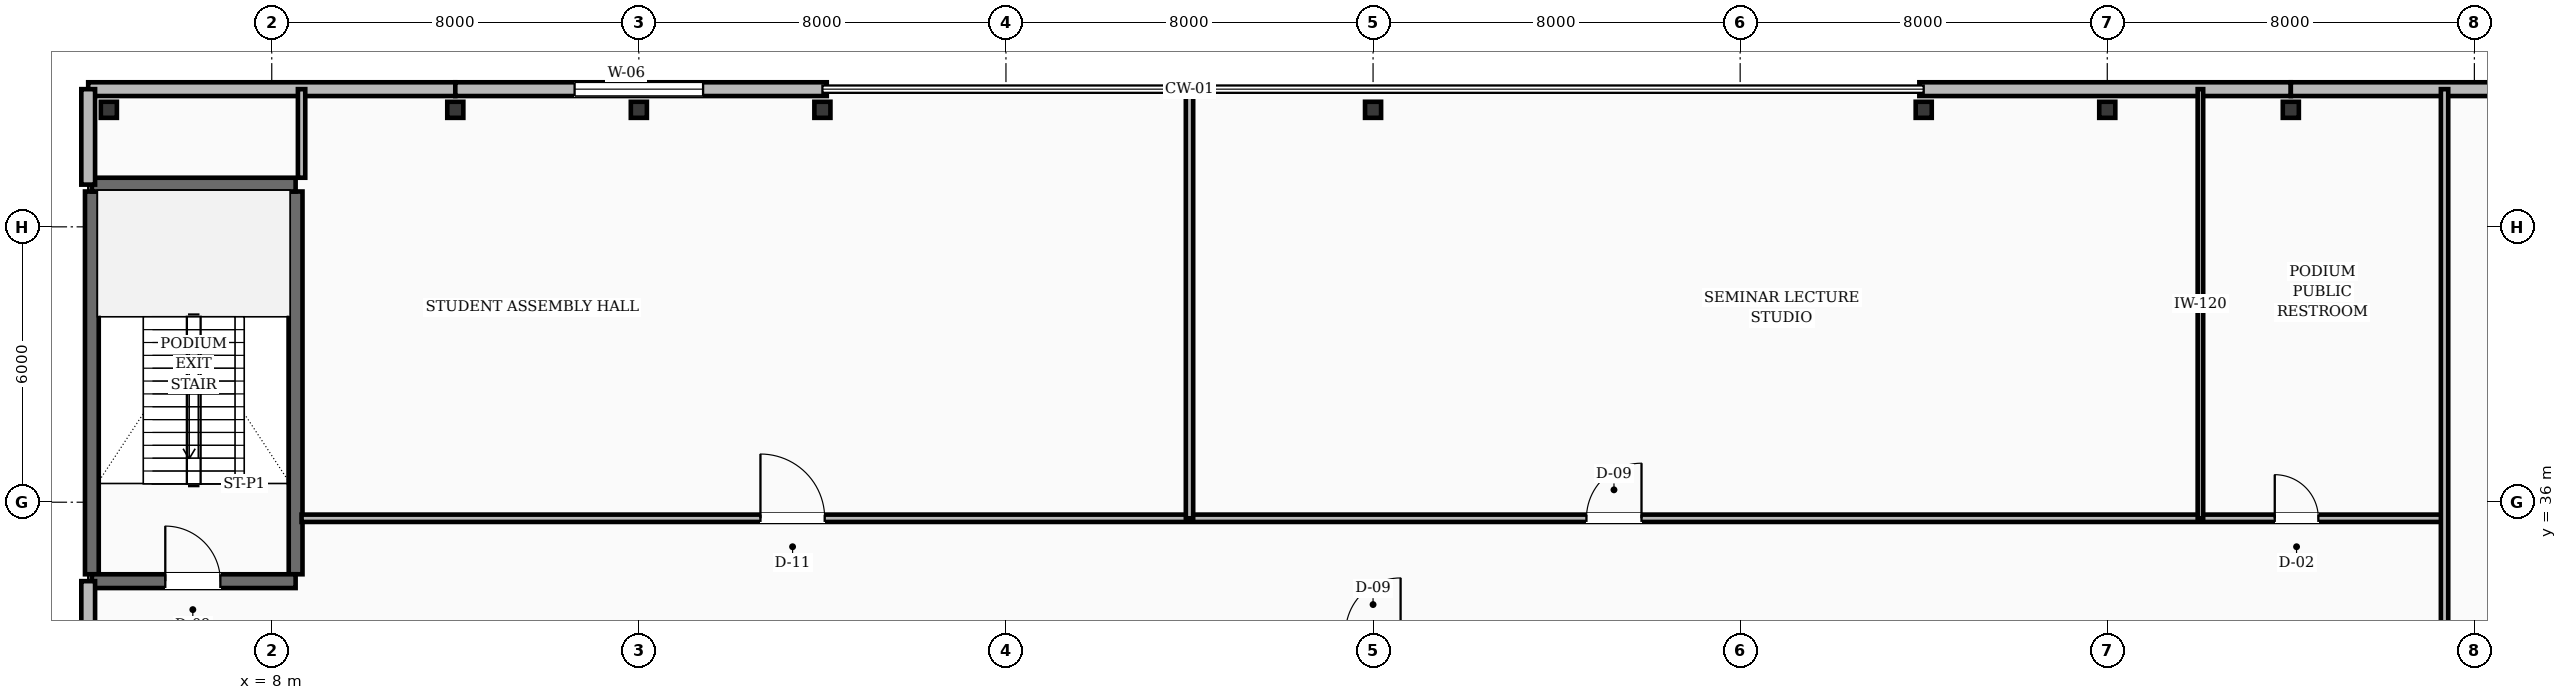
"""IFC4 building model, lengths in metres.
Left out: names, types, materials, properties, quantities, classifications, styles, units other than length and angle.
Written with IfcOpenShell. Run it as: python <this file> out.ifc"""

import sys

from ifc_helpers import new_model, si_unit, direction, frame, frame_2d, origin, origin_2d, place, context, subcontext, project, spatial, rectangle, hollow_rectangle, i_section, extrude, element, fill, save


model = new_model("IFC4")
c1 = context("Model", 3, precision=1e-05, world=origin(), true_north=direction((0.0, 1.0)))
c2 = subcontext(c1, "Body", "Model", "MODEL_VIEW")
j1 = project(units=[si_unit("LENGTHUNIT", "METRE"), si_unit("PLANEANGLEUNIT", "RADIAN")], contexts=[c1])
p1 = place(None, origin())
s1 = spatial("IfcSite", under=j1, at=p1, CompositionType="ELEMENT")
p2 = place(p1, origin())
s2 = spatial("IfcBuilding", under=s1, at=p2, CompositionType="ELEMENT")
p3 = place(p2, frame((0.0, 0.0, 10.0)))
s3 = spatial("IfcBuildingStorey", under=s2, at=p3, CompositionType="ELEMENT", Elevation=10.0)
for number, where, z_axis, x_axis in (
    (1, (4.08, 34.43, 0.0), (0.0, 0.0, 1.0), (0.0, 1.0, 0.0)),
    (2, (8.52, 34.43, 0.0), (0.0, 0.0, 1.0), (0.0, 1.0, 0.0)),
):
    element("IfcWall", number, at=place(p3, frame(where, z_axis=z_axis, x_axis=x_axis)), inside=s3, PredefinedType="SHEAR", context=c2, shape_type="SweptSolid", body=[
        extrude(rectangle(XDim=8.34, YDim=0.3, at=frame_2d((4.17, 0.0))), origin(), (0.0, 0.0, 1.0), 4.8),
    ])
p4 = place(p3, frame((4.08, 34.28, 0.0), z_axis=(0.0, 0.0, 1.0), x_axis=(1.0, 0.0, 0.0)))
e3 = element("IfcWall", 3, at=p4, inside=s3, PredefinedType="SHEAR", context=c2, shape_type="SweptSolid", body=[
    extrude(rectangle(XDim=4.44, YDim=0.3, at=frame_2d((2.22, 0.0))), origin(), (0.0, 0.0, 1.0), 4.8),
])
p5 = place(p4, frame((1.6, 0.0, 0.0)))
e4 = element("IfcOpeningElement", 4, at=p5, cuts=e3, PredefinedType="OPENING", context=c2, shape_type="SweptSolid", body=[
    extrude(rectangle(XDim=1.2, YDim=2.1, at=frame_2d((0.6, 1.05))), frame((0.0, 0.16, 0.0), z_axis=(0.0, -1.0, 0.0), x_axis=(1.0, 0.0, 0.0)), (0.0, 0.0, 1.0), 0.32),
])
p6 = place(p3, frame((4.08, 42.92, 0.0), z_axis=(0.0, 0.0, 1.0), x_axis=(1.0, 0.0, 0.0)))
e5 = element("IfcWall", 5, at=p6, inside=s3, PredefinedType="SHEAR", context=c2, shape_type="SweptSolid", body=[
    extrude(rectangle(XDim=4.44, YDim=0.3, at=frame_2d((2.22, 0.0))), origin(), (0.0, 0.0, 1.0), 4.8),
])
for number, where, z_axis, x_axis in (
    (6, (4.45, 44.55, 0.0), (0.0, 0.0, 1.0), (1.0, 0.0, 0.0)),
    (7, (12.0, 44.55, 0.0), (0.0, 0.0, 1.0), (1.0, 0.0, 0.0)),
    (8, (20.0, 44.55, 0.0), (0.0, 0.0, 1.0), (1.0, 0.0, 0.0)),
    (9, (32.0, 44.55, 0.0), (0.0, 0.0, 1.0), (1.0, 0.0, 0.0)),
    (10, (44.0, 44.55, 0.0), (0.0, 0.0, 1.0), (1.0, 0.0, 0.0)),
    (11, (52.0, 44.55, 0.0), (0.0, 0.0, 1.0), (1.0, 0.0, 0.0)),
):
    element("IfcColumn", number, at=place(p3, frame(where, z_axis=z_axis, x_axis=x_axis)), inside=s3, PredefinedType="COLUMN", context=c2, shape_type="SweptSolid", body=[
        extrude(i_section(OverallWidth=0.35, OverallDepth=0.35, WebThickness=0.012, FlangeThickness=0.019, FilletRadius=0.016, at=origin_2d()), origin(), (0.0, 0.0, 1.0), 4.8),
    ])
for number, where, z_axis, x_axis in (
    (12, (16.0, 44.55, 0.0), (0.0, 0.0, 1.0), (1.0, 0.0, 0.0)),
    (13, (48.0, 44.55, 0.0), (0.0, 0.0, 1.0), (1.0, 0.0, 0.0)),
):
    element("IfcColumn", number, at=place(p3, frame(where, z_axis=z_axis, x_axis=x_axis)), inside=s3, PredefinedType="PILASTER", context=c2, shape_type="SweptSolid", body=[
        extrude(hollow_rectangle(XDim=0.35, YDim=0.35, WallThickness=0.016, at=origin_2d()), origin(), (0.0, 0.0, 1.0), 4.8),
    ])
p7 = place(p3, frame((12.0, 45.0, 0.0), z_axis=(0.0, 0.0, 1.0), x_axis=(-1.0, 0.0, 0.0)))
e14 = element("IfcWall", 14, at=p7, inside=s3, PredefinedType="STANDARD", context=c2, shape_type="SweptSolid", body=[
    extrude(rectangle(XDim=8.0, YDim=0.3, at=frame_2d((4.0, 0.0))), origin(), (0.0, 0.0, 1.0), 3.57),
])
p8 = place(p3, frame((20.095, 45.0, 0.0), z_axis=(0.0, 0.0, 1.0), x_axis=(-1.0, 0.0, 0.0)))
e15 = element("IfcWall", 15, at=p8, inside=s3, PredefinedType="STANDARD", context=c2, shape_type="SweptSolid", body=[
    extrude(rectangle(XDim=8.095, YDim=0.3, at=frame_2d((4.047, 0.0))), origin(), (0.0, 0.0, 1.0), 3.57),
])
p9 = place(p8, frame((2.695, 0.0, 0.85)))
e16 = element("IfcOpeningElement", 16, at=p9, cuts=e15, PredefinedType="OPENING", context=c2, shape_type="SweptSolid", body=[
    extrude(rectangle(XDim=2.8, YDim=2.3, at=frame_2d((1.4, 1.15))), frame((0.0, 0.16, 0.0), z_axis=(0.0, -1.0, 0.0), x_axis=(1.0, 0.0, 0.0)), (0.0, 0.0, 1.0), 0.32),
])
p10 = place(p3, frame((52.0, 45.0, 0.0), z_axis=(0.0, 0.0, 1.0), x_axis=(-1.0, 0.0, 0.0)))
e17 = element("IfcWall", 17, at=p10, inside=s3, PredefinedType="STANDARD", context=c2, shape_type="SweptSolid", body=[
    extrude(rectangle(XDim=8.095, YDim=0.3, at=frame_2d((4.047, 0.0))), origin(), (0.0, 0.0, 1.0), 3.57),
])
p11 = place(p3, frame((60.0, 45.0, 0.0), z_axis=(0.0, 0.0, 1.0), x_axis=(-1.0, 0.0, 0.0)))
e18 = element("IfcWall", 18, at=p11, inside=s3, PredefinedType="STANDARD", context=c2, shape_type="SweptSolid", body=[
    extrude(rectangle(XDim=8.0, YDim=0.3, at=frame_2d((4.0, 0.0))), origin(), (0.0, 0.0, 1.0), 3.57),
])
p12 = place(p3, frame((4.0, 34.28, 0.0), z_axis=(0.0, 0.0, 1.0), x_axis=(0.0, -1.0, 0.0)))
e19 = element("IfcWall", 19, at=p12, inside=s3, PredefinedType="STANDARD", context=c2, shape_type="SweptSolid", body=[
    extrude(rectangle(XDim=1.88, YDim=0.3, at=frame_2d((0.94, 0.0))), origin(), (0.0, 0.0, 1.0), 3.57),
])
p13 = place(p3, frame((4.0, 45.0, 0.0), z_axis=(0.0, 0.0, 1.0), x_axis=(0.0, -1.0, 0.0)))
e20 = element("IfcWall", 20, at=p13, inside=s3, PredefinedType="STANDARD", context=c2, shape_type="SweptSolid", body=[
    extrude(rectangle(XDim=2.08, YDim=0.3, at=frame_2d((1.04, 0.0))), origin(), (0.0, 0.0, 1.0), 3.57),
])
p14 = place(p3, frame((8.65, 35.65, 0.0), z_axis=(0.0, 0.0, 1.0), x_axis=(1.0, 0.0, 0.0)))
e21 = element("IfcWall", 21, at=p14, inside=s3, PredefinedType="SOLIDWALL", context=c2, shape_type="SweptSolid", body=[
    extrude(rectangle(XDim=46.7, YDim=0.16, at=frame_2d((23.35, 0.0))), origin(), (0.0, 0.0, 1.0), 3.52),
])
p15 = place(p14, frame((10.0, 0.0, 0.0)))
e22 = element("IfcOpeningElement", 22, at=p15, cuts=e21, PredefinedType="OPENING", context=c2, shape_type="SweptSolid", body=[
    extrude(rectangle(XDim=1.4, YDim=2.15, at=frame_2d((0.7, 1.075))), frame((0.0, 0.09, 0.0), z_axis=(0.0, -1.0, 0.0), x_axis=(1.0, 0.0, 0.0)), (0.0, 0.0, 1.0), 0.18),
])
p16 = place(p14, frame((28.0, 0.0, 0.0)))
e23 = element("IfcOpeningElement", 23, at=p16, cuts=e21, PredefinedType="OPENING", context=c2, shape_type="SweptSolid", body=[
    extrude(rectangle(XDim=1.2, YDim=2.1, at=frame_2d((0.6, 1.05))), frame((0.0, 0.09, 0.0), z_axis=(0.0, -1.0, 0.0), x_axis=(1.0, 0.0, 0.0)), (0.0, 0.0, 1.0), 0.18),
])
p17 = place(p14, frame((43.0, 0.0, 0.0)))
e24 = element("IfcOpeningElement", 24, at=p17, cuts=e21, PredefinedType="OPENING", context=c2, shape_type="SweptSolid", body=[
    extrude(rectangle(XDim=0.95, YDim=2.1, at=frame_2d((0.475, 1.05))), frame((0.0, 0.09, 0.0), z_axis=(0.0, -1.0, 0.0), x_axis=(1.0, 0.0, 0.0)), (0.0, 0.0, 1.0), 0.18),
])
p18 = place(p3, frame((55.35, 15.55, 0.0), z_axis=(0.0, 0.0, 1.0), x_axis=(0.0, 1.0, 0.0)))
e25 = element("IfcWall", 25, at=p18, inside=s3, PredefinedType="SOLIDWALL", context=c2, shape_type="SweptSolid", body=[
    extrude(rectangle(XDim=29.45, YDim=0.16, at=frame_2d((14.725, 0.0))), origin(), (0.0, 0.0, 1.0), 3.52),
])
p19 = place(p18, frame((8.0, 0.0, 0.0)))
e26 = element("IfcOpeningElement", 26, at=p19, cuts=e25, PredefinedType="OPENING", context=c2, shape_type="SweptSolid", body=[
    extrude(rectangle(XDim=1.4, YDim=2.15, at=frame_2d((0.7, 1.075))), frame((0.0, 0.09, 0.0), z_axis=(0.0, -1.0, 0.0), x_axis=(1.0, 0.0, 0.0)), (0.0, 0.0, 1.0), 0.18),
])
p20 = place(p3, frame((8.65, 43.07, 0.0), z_axis=(0.0, 0.0, 1.0), x_axis=(0.0, 1.0, 0.0)))
e27 = element("IfcWall", 27, at=p20, inside=s3, PredefinedType="SOLIDWALL", context=c2, shape_type="SweptSolid", body=[
    extrude(rectangle(XDim=1.93, YDim=0.16, at=frame_2d((0.965, 0.0))), origin(), (0.0, 0.0, 1.0), 3.52),
])
p21 = place(p3, frame((28.0, 35.65, 0.0), z_axis=(0.0, 0.0, 1.0), x_axis=(0.0, 1.0, 0.0)))
e28 = element("IfcWall", 28, at=p21, inside=s3, PredefinedType="SOLIDWALL", context=c2, shape_type="SweptSolid", body=[
    extrude(rectangle(XDim=9.35, YDim=0.16, at=frame_2d((4.675, 0.0))), origin(), (0.0, 0.0, 1.0), 3.52),
])
p22 = place(p3, frame((50.03, 35.65, 0.0), z_axis=(0.0, 0.0, 1.0), x_axis=(0.0, 1.0, 0.0)))
e29 = element("IfcWall", 29, at=p22, inside=s3, PredefinedType="PARTITIONING", context=c2, shape_type="SweptSolid", body=[
    extrude(rectangle(XDim=9.35, YDim=0.12, at=frame_2d((4.675, 0.0))), origin(), (0.0, 0.0, 1.0), 3.52),
])
p23 = place(p9, origin())
e30 = element("IfcWindow", 30, at=p23, inside=s3, PartitioningType="SINGLE_PANEL", PredefinedType="WINDOW", context=c2, shape_type="SweptSolid", body=[
    extrude(rectangle(XDim=2.8, YDim=2.3, at=frame_2d((1.4, 1.15))), frame((0.0, 0.03, 0.0), z_axis=(0.0, -1.0, 0.0), x_axis=(1.0, 0.0, 0.0)), (0.0, 0.0, 1.0), 0.06),
])
fill(e16, e30)
p24 = place(p5, origin())
e31 = element("IfcDoor", 31, at=p24, inside=s3, OperationType="SINGLE_SWING_LEFT", PredefinedType="DOOR", context=c2, shape_type="SweptSolid", body=[
    extrude(rectangle(XDim=1.2, YDim=2.1, at=frame_2d((0.6, 1.05))), frame((0.0, 0.025, 0.0), z_axis=(0.0, -1.0, 0.0), x_axis=(1.0, 0.0, 0.0)), (0.0, 0.0, 1.0), 0.05),
])
fill(e4, e31)
p25 = place(p15, origin())
e32 = element("IfcDoor", 32, at=p25, inside=s3, OperationType="SINGLE_SWING_LEFT", PredefinedType="DOOR", context=c2, shape_type="SweptSolid", body=[
    extrude(rectangle(XDim=1.4, YDim=2.15, at=frame_2d((0.7, 1.075))), frame((0.0, 0.025, 0.0), z_axis=(0.0, -1.0, 0.0), x_axis=(1.0, 0.0, 0.0)), (0.0, 0.0, 1.0), 0.05),
])
fill(e22, e32)
p26 = place(p16, origin())
e33 = element("IfcDoor", 33, at=p26, inside=s3, OperationType="SINGLE_SWING_RIGHT", PredefinedType="DOOR", context=c2, shape_type="SweptSolid", body=[
    extrude(rectangle(XDim=1.2, YDim=2.1, at=frame_2d((0.6, 1.05))), frame((0.0, 0.025, 0.0), z_axis=(0.0, -1.0, 0.0), x_axis=(1.0, 0.0, 0.0)), (0.0, 0.0, 1.0), 0.05),
])
fill(e23, e33)
p27 = place(p17, origin())
e34 = element("IfcDoor", 34, at=p27, inside=s3, OperationType="SINGLE_SWING_LEFT", PredefinedType="DOOR", context=c2, shape_type="SweptSolid", body=[
    extrude(rectangle(XDim=0.95, YDim=2.1, at=frame_2d((0.475, 1.05))), frame((0.0, 0.025, 0.0), z_axis=(0.0, -1.0, 0.0), x_axis=(1.0, 0.0, 0.0)), (0.0, 0.0, 1.0), 0.05),
])
fill(e24, e34)
save(model, sys.argv[1])
